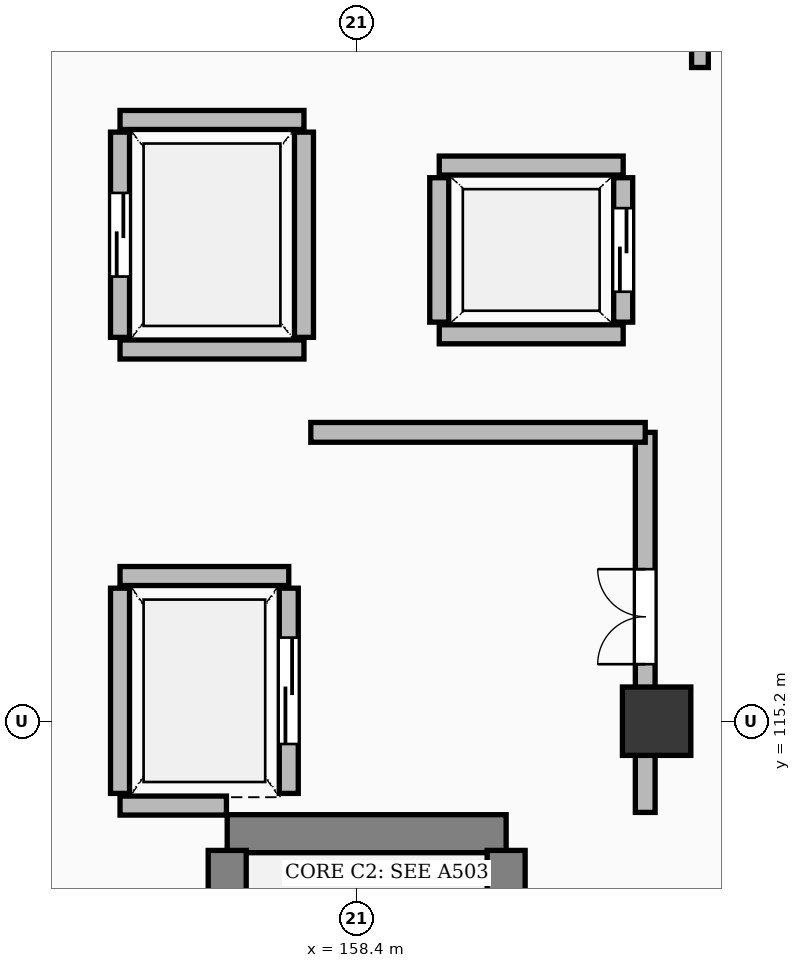
"""IFC4 building model, lengths in metres.
Left out: names, types, materials, properties, quantities, classifications, styles, units other than length and angle.
Written with IfcOpenShell. Run it as: python <this file> out.ifc"""

import sys

from ifc_helpers import new_model, si_unit, direction, frame, frame_2d, origin, origin_2d, place, context, subcontext, project, spatial, rectangle, extrude, element, fill, save


model = new_model("IFC4")
c1 = context("Model", 3, precision=1e-05, world=origin(), true_north=direction((0.0, 1.0)))
c2 = subcontext(c1, "Body", "Model", "MODEL_VIEW")
j1 = project(units=[si_unit("LENGTHUNIT", "METRE"), si_unit("PLANEANGLEUNIT", "RADIAN")], contexts=[c1])
p1 = place(None, origin())
s1 = spatial("IfcSite", under=j1, at=p1, CompositionType="ELEMENT")
p2 = place(p1, origin())
s2 = spatial("IfcBuilding", under=s1, at=p2, CompositionType="ELEMENT")
p3 = place(p2, frame((0.0, 0.0, 16.2)))
s3 = spatial("IfcBuildingStorey", under=s2, at=p3, CompositionType="ELEMENT", Elevation=16.2)
p4 = place(p3, frame((162.35, 115.2, 0.0), z_axis=(0.0, 0.0, 1.0), x_axis=(1.0, 0.0, 0.0)))
e1 = element("IfcColumn", 1, at=p4, inside=s3, PredefinedType="COLUMN", context=c2, shape_type="SweptSolid", body=[
    extrude(rectangle(XDim=0.9, YDim=0.9, at=origin_2d()), origin(), (0.0, 0.0, 1.0), 4.8),
])
p5 = place(p3, frame((156.7, 113.72, 0.0), z_axis=(0.0, 0.0, 1.0), x_axis=(1.0, 0.0, 0.0)))
e2 = element("IfcWall", 2, at=p5, inside=s3, PredefinedType="SHEAR", context=c2, shape_type="SweptSolid", body=[
    extrude(rectangle(XDim=3.67, YDim=0.5, at=frame_2d((1.835, 0.0))), origin(), (0.0, 0.0, 1.0), 4.54),
])
p6 = place(p3, frame((156.7, 103.0, 0.0), z_axis=(0.0, 0.0, 1.0), x_axis=(0.0, 1.0, 0.0)))
e3 = element("IfcWall", 3, at=p6, inside=s3, PredefinedType="SHEAR", context=c2, shape_type="SweptSolid", body=[
    extrude(rectangle(XDim=10.5, YDim=0.5, at=frame_2d((5.25, 0.0))), origin(), (0.0, 0.0, 1.0), 4.54),
])
p7 = place(p3, frame((160.37, 103.0, 0.0), z_axis=(0.0, 0.0, 1.0), x_axis=(0.0, 1.0, 0.0)))
e4 = element("IfcWall", 4, at=p7, inside=s3, PredefinedType="SHEAR", context=c2, shape_type="SweptSolid", body=[
    extrude(rectangle(XDim=10.5, YDim=0.5, at=frame_2d((5.25, 0.0))), origin(), (0.0, 0.0, 1.0), 4.54),
])
p8 = place(p7, frame((0.45, 0.0, 0.0)))
e5 = element("IfcOpeningElement", 5, at=p8, cuts=e4, PredefinedType="OPENING", context=c2, shape_type="SweptSolid", body=[
    extrude(rectangle(XDim=1.3, YDim=2.15, at=frame_2d((0.65, 1.075))), frame((0.0, 0.262, 0.0), z_axis=(0.0, -1.0, 0.0), x_axis=(1.0, 0.0, 0.0)), (0.0, 0.0, 1.0), 0.524),
])
p9 = place(p3, frame((155.29, 114.09, 0.0), z_axis=(0.0, 0.0, 1.0), x_axis=(1.0, 0.0, 0.0)))
e6 = element("IfcWall", 6, at=p9, inside=s3, PredefinedType="SOLIDWALL", context=c2, shape_type="SweptSolid", body=[
    extrude(rectangle(XDim=1.4, YDim=0.25, at=frame_2d((0.7, 0.0))), origin(), (0.0, 0.0, 1.0), 4.54),
])
p10 = place(p3, frame((155.29, 117.11, 0.0), z_axis=(0.0, 0.0, 1.0), x_axis=(1.0, 0.0, 0.0)))
e7 = element("IfcWall", 7, at=p10, inside=s3, PredefinedType="SOLIDWALL", context=c2, shape_type="SweptSolid", body=[
    extrude(rectangle(XDim=2.22, YDim=0.25, at=frame_2d((1.11, 0.0))), origin(), (0.0, 0.0, 1.0), 4.54),
])
p11 = place(p3, frame((155.29, 114.25, 0.0), z_axis=(0.0, 0.0, 1.0), x_axis=(0.0, 1.0, 0.0)))
e8 = element("IfcWall", 8, at=p11, inside=s3, PredefinedType="SOLIDWALL", context=c2, shape_type="SweptSolid", body=[
    extrude(rectangle(XDim=2.7, YDim=0.25, at=frame_2d((1.35, 0.0))), origin(), (0.0, 0.0, 1.0), 3.732),
])
p12 = place(p3, frame((157.51, 114.25, 0.0), z_axis=(0.0, 0.0, 1.0), x_axis=(0.0, 1.0, 0.0)))
e9 = element("IfcWall", 9, at=p12, inside=s3, PredefinedType="SOLIDWALL", context=c2, shape_type="SweptSolid", body=[
    extrude(rectangle(XDim=2.7, YDim=0.25, at=frame_2d((1.35, 0.0))), origin(), (0.0, 0.0, 1.0), 3.732),
])
p13 = place(p12, frame((0.65, 0.0, 0.0)))
e10 = element("IfcOpeningElement", 10, at=p13, cuts=e9, PredefinedType="OPENING", context=c2, shape_type="SweptSolid", body=[
    extrude(rectangle(XDim=1.4, YDim=2.3, at=frame_2d((0.7, 1.15))), frame((0.0, 0.137, 0.0), z_axis=(0.0, -1.0, 0.0), x_axis=(1.0, 0.0, 0.0)), (0.0, 0.0, 1.0), 0.274),
])
for number, where, z_axis, x_axis in (
    (11, (159.49, 120.29, 0.0), (0.0, 0.0, 1.0), (1.0, 0.0, 0.0)),
    (12, (159.49, 122.51, 0.0), (0.0, 0.0, 1.0), (1.0, 0.0, 0.0)),
):
    element("IfcWall", number, at=place(p3, frame(where, z_axis=z_axis, x_axis=x_axis)), inside=s3, PredefinedType="SOLIDWALL", context=c2, shape_type="SweptSolid", body=[
        extrude(rectangle(XDim=2.42, YDim=0.25, at=frame_2d((1.21, 0.0))), origin(), (0.0, 0.0, 1.0), 3.132),
    ])
p14 = place(p3, frame((159.49, 120.45, 0.0), z_axis=(0.0, 0.0, 1.0), x_axis=(0.0, 1.0, 0.0)))
e13 = element("IfcWall", 13, at=p14, inside=s3, PredefinedType="SOLIDWALL", context=c2, shape_type="SweptSolid", body=[
    extrude(rectangle(XDim=1.9, YDim=0.25, at=frame_2d((0.95, 0.0))), origin(), (0.0, 0.0, 1.0), 4.54),
])
p15 = place(p3, frame((161.91, 120.45, 0.0), z_axis=(0.0, 0.0, 1.0), x_axis=(0.0, 1.0, 0.0)))
e14 = element("IfcWall", 14, at=p15, inside=s3, PredefinedType="SOLIDWALL", context=c2, shape_type="SweptSolid", body=[
    extrude(rectangle(XDim=1.9, YDim=0.25, at=frame_2d((0.95, 0.0))), origin(), (0.0, 0.0, 1.0), 3.132),
])
p16 = place(p15, frame((0.4, 0.0, 0.0)))
e15 = element("IfcOpeningElement", 15, at=p16, cuts=e14, PredefinedType="OPENING", context=c2, shape_type="SweptSolid", body=[
    extrude(rectangle(XDim=1.1, YDim=2.2, at=frame_2d((0.55, 1.1))), frame((0.0, 0.137, 0.0), z_axis=(0.0, -1.0, 0.0), x_axis=(1.0, 0.0, 0.0)), (0.0, 0.0, 1.0), 0.274),
])
for number, where, z_axis, x_axis in (
    (16, (155.29, 120.09, 0.0), (0.0, 0.0, 1.0), (1.0, 0.0, 0.0)),
    (17, (155.29, 123.11, 0.0), (0.0, 0.0, 1.0), (1.0, 0.0, 0.0)),
):
    element("IfcWall", number, at=place(p3, frame(where, z_axis=z_axis, x_axis=x_axis)), inside=s3, PredefinedType="SOLIDWALL", context=c2, shape_type="SweptSolid", body=[
        extrude(rectangle(XDim=2.42, YDim=0.25, at=frame_2d((1.21, 0.0))), origin(), (0.0, 0.0, 1.0), 4.54),
    ])
p17 = place(p3, frame((155.29, 120.25, 0.0), z_axis=(0.0, 0.0, 1.0), x_axis=(0.0, 1.0, 0.0)))
e18 = element("IfcWall", 18, at=p17, inside=s3, PredefinedType="SOLIDWALL", context=c2, shape_type="SweptSolid", body=[
    extrude(rectangle(XDim=2.7, YDim=0.25, at=frame_2d((1.35, 0.0))), origin(), (0.0, 0.0, 1.0), 4.54),
])
p18 = place(p17, frame((0.8, 0.0, 0.0)))
e19 = element("IfcOpeningElement", 19, at=p18, cuts=e18, PredefinedType="OPENING", context=c2, shape_type="SweptSolid", body=[
    extrude(rectangle(XDim=1.1, YDim=2.2, at=frame_2d((0.55, 1.1))), frame((0.0, 0.137, 0.0), z_axis=(0.0, -1.0, 0.0), x_axis=(1.0, 0.0, 0.0)), (0.0, 0.0, 1.0), 0.274),
])
p19 = place(p3, frame((157.71, 120.25, 0.0), z_axis=(0.0, 0.0, 1.0), x_axis=(0.0, 1.0, 0.0)))
e20 = element("IfcWall", 20, at=p19, inside=s3, PredefinedType="SOLIDWALL", context=c2, shape_type="SweptSolid", body=[
    extrude(rectangle(XDim=2.7, YDim=0.25, at=frame_2d((1.35, 0.0))), origin(), (0.0, 0.0, 1.0), 4.54),
])
p20 = place(p3, frame((162.2, 114.0, 0.0), z_axis=(0.0, 0.0, 1.0), x_axis=(0.0, 1.0, 0.0)))
e21 = element("IfcWall", 21, at=p20, inside=s3, PredefinedType="SOLIDWALL", context=c2, shape_type="SweptSolid", body=[
    extrude(rectangle(XDim=5.0, YDim=0.26, at=frame_2d((2.5, 0.0))), origin(), (0.0, 0.0, 1.0), 3.132),
])
p21 = place(p20, frame((1.95, 0.0, 0.0)))
e22 = element("IfcOpeningElement", 22, at=p21, cuts=e21, PredefinedType="OPENING", context=c2, shape_type="SweptSolid", body=[
    extrude(rectangle(XDim=1.25, YDim=2.15, at=frame_2d((0.625, 1.075))), frame((0.0, 0.142, 0.0), z_axis=(0.0, -1.0, 0.0), x_axis=(1.0, 0.0, 0.0)), (0.0, 0.0, 1.0), 0.284),
])
p22 = place(p3, frame((157.8, 119.0, 0.0), z_axis=(0.0, 0.0, 1.0), x_axis=(1.0, 0.0, 0.0)))
e23 = element("IfcWall", 23, at=p22, inside=s3, PredefinedType="SOLIDWALL", context=c2, shape_type="SweptSolid", body=[
    extrude(rectangle(XDim=4.4, YDim=0.26, at=frame_2d((2.2, 0.0))), origin(), (0.0, 0.0, 1.0), 3.132),
])
p23 = place(p3, frame((162.92, 123.8, 0.0), z_axis=(0.0, 0.0, 1.0), x_axis=(0.0, 1.0, 0.0)))
e24 = element("IfcWall", 24, at=p23, inside=s3, PredefinedType="PARTITIONING", context=c2, shape_type="SweptSolid", body=[
    extrude(rectangle(XDim=1.85, YDim=0.22, at=frame_2d((0.925, 0.0))), origin(), (0.0, 0.0, 1.0), 3.782),
])
p24 = place(p13, origin())
e25 = element("IfcDoor", 25, at=p24, inside=s3, OperationType="SLIDING_TO_LEFT", PredefinedType="DOOR", context=c2, shape_type="SweptSolid", body=[
    extrude(rectangle(XDim=1.4, YDim=2.3, at=frame_2d((0.7, 1.15))), frame((0.0, 0.025, 0.0), z_axis=(0.0, -1.0, 0.0), x_axis=(1.0, 0.0, 0.0)), (0.0, 0.0, 1.0), 0.05),
])
fill(e10, e25)
p25 = place(p16, origin())
e26 = element("IfcDoor", 26, at=p25, inside=s3, OperationType="SLIDING_TO_LEFT", PredefinedType="DOOR", context=c2, shape_type="SweptSolid", body=[
    extrude(rectangle(XDim=1.1, YDim=2.2, at=frame_2d((0.55, 1.1))), frame((0.0, 0.025, 0.0), z_axis=(0.0, -1.0, 0.0), x_axis=(1.0, 0.0, 0.0)), (0.0, 0.0, 1.0), 0.05),
])
fill(e15, e26)
p26 = place(p18, origin())
e27 = element("IfcDoor", 27, at=p26, inside=s3, OperationType="SLIDING_TO_LEFT", PredefinedType="DOOR", context=c2, shape_type="SweptSolid", body=[
    extrude(rectangle(XDim=1.1, YDim=2.2, at=frame_2d((0.55, 1.1))), frame((0.0, 0.025, 0.0), z_axis=(0.0, -1.0, 0.0), x_axis=(1.0, 0.0, 0.0)), (0.0, 0.0, 1.0), 0.05),
])
fill(e19, e27)
p27 = place(p21, origin())
e28 = element("IfcDoor", 28, at=p27, inside=s3, OperationType="DOUBLE_DOOR_SINGLE_SWING", PredefinedType="DOOR", context=c2, shape_type="SweptSolid", body=[
    extrude(rectangle(XDim=1.25, YDim=2.15, at=frame_2d((0.625, 1.075))), frame((0.0, 0.025, 0.0), z_axis=(0.0, -1.0, 0.0), x_axis=(1.0, 0.0, 0.0)), (0.0, 0.0, 1.0), 0.05),
])
fill(e22, e28)
save(model, sys.argv[1])
